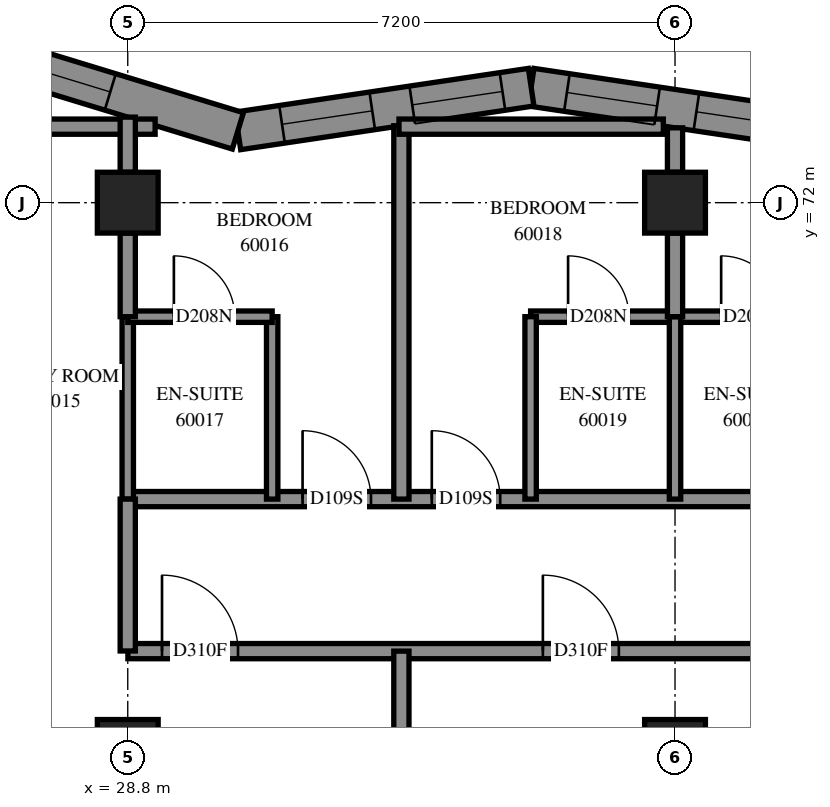
"""IFC4 building model, lengths in metres.
Left out: names, types, materials, properties, quantities, classifications, styles, units other than length and angle.
Written with IfcOpenShell. Run it as: python <this file> out.ifc"""

import sys

from ifc_helpers import new_model, si_unit, direction, frame, frame_2d, origin, origin_2d, place, context, subcontext, project, spatial, polyline, rectangle, outline, extrude, element, fill, save


model = new_model("IFC4")
c1 = context("Model", 3, precision=1e-05, world=origin(), true_north=direction((0.0, 1.0)))
c2 = subcontext(c1, "Body", "Model", "MODEL_VIEW")
j1 = project(units=[si_unit("LENGTHUNIT", "METRE"), si_unit("PLANEANGLEUNIT", "RADIAN")], contexts=[c1])
p1 = place(None, origin())
s1 = spatial("IfcSite", under=j1, at=p1, CompositionType="ELEMENT")
p2 = place(p1, origin())
s2 = spatial("IfcBuilding", under=s1, at=p2, CompositionType="ELEMENT")
p3 = place(p2, frame((0.0, 0.0, 220.2)))
s3 = spatial("IfcBuildingStorey", under=s2, at=p3, CompositionType="ELEMENT", Elevation=220.2)
for number, where, z_axis, x_axis in (
    (1, (28.8, 64.8, 0.0), (0.0, 0.0, 1.0), (1.0, 0.0, 0.0)),
    (2, (28.8, 72.0, 0.0), (0.0, 0.0, 1.0), (1.0, 0.0, 0.0)),
    (3, (36.0, 64.8, 0.0), (0.0, 0.0, 1.0), (1.0, 0.0, 0.0)),
    (4, (36.0, 72.0, 0.0), (0.0, 0.0, 1.0), (1.0, 0.0, 0.0)),
):
    element("IfcColumn", number, at=place(p3, frame(where, z_axis=z_axis, x_axis=x_axis)), inside=s3, PredefinedType="COLUMN", context=c2, shape_type="SweptSolid", body=[
        extrude(rectangle(XDim=0.8, YDim=0.8, at=origin_2d()), origin(), (0.0, 0.0, 1.0), 3.1),
    ])
p4 = place(p3, frame((37.947, 72.947, 0.0), z_axis=(0.0, 0.0, 1.0), x_axis=(-0.9890847468, 0.1473477641, 0.0)))
e5 = element("IfcWall", 5, at=p4, inside=s3, PredefinedType="SOLIDWALL", context=c2, shape_type="SweptSolid", body=[
    extrude(outline(polyline([(0.037, -0.25), (3.919, -0.25), (3.845, 0.25), (-0.037, 0.25), (0.037, -0.25)])), origin(), (0.0, 0.0, 1.0), 3.1),
])
p5 = place(p4, frame((0.484, 0.0, 0.45)))
e6 = element("IfcOpeningElement", 6, at=p5, cuts=e5, PredefinedType="OPENING", context=c2, shape_type="SweptSolid", body=[
    extrude(rectangle(XDim=1.2, YDim=2.5, at=frame_2d((0.6, 1.25))), frame((0.0, 0.26, 0.0), z_axis=(0.0, -1.0, 0.0), x_axis=(1.0, 0.0, 0.0)), (0.0, 0.0, 1.0), 0.52),
])
p6 = place(p4, frame((2.207, 0.0, 0.45)))
e7 = element("IfcOpeningElement", 7, at=p6, cuts=e5, PredefinedType="OPENING", context=c2, shape_type="SweptSolid", body=[
    extrude(rectangle(XDim=1.2, YDim=2.5, at=frame_2d((0.6, 1.25))), frame((0.0, 0.26, 0.0), z_axis=(0.0, -1.0, 0.0), x_axis=(1.0, 0.0, 0.0)), (0.0, 0.0, 1.0), 0.52),
])
p7 = place(p3, frame((34.107, 73.519, 0.0), z_axis=(0.0, 0.0, 1.0), x_axis=(-0.9890858863, -0.1473401149, 0.0)))
e8 = element("IfcWall", 8, at=p7, inside=s3, PredefinedType="SOLIDWALL", context=c2, shape_type="SweptSolid", body=[
    extrude(outline(polyline([(-0.037, -0.25), (3.845, -0.25), (3.958, 0.25), (0.037, 0.25), (-0.037, -0.25)])), origin(), (0.0, 0.0, 1.0), 3.1),
])
p8 = place(p7, frame((0.382, 0.0, 0.45)))
e9 = element("IfcOpeningElement", 9, at=p8, cuts=e8, PredefinedType="OPENING", context=c2, shape_type="SweptSolid", body=[
    extrude(rectangle(XDim=1.2, YDim=2.5, at=frame_2d((0.6, 1.25))), frame((0.0, 0.26, 0.0), z_axis=(0.0, -1.0, 0.0), x_axis=(1.0, 0.0, 0.0)), (0.0, 0.0, 1.0), 0.52),
])
p9 = place(p7, frame((2.114, 0.0, 0.45)))
e10 = element("IfcOpeningElement", 10, at=p9, cuts=e8, PredefinedType="OPENING", context=c2, shape_type="SweptSolid", body=[
    extrude(rectangle(XDim=1.2, YDim=2.5, at=frame_2d((0.6, 1.25))), frame((0.0, 0.26, 0.0), z_axis=(0.0, -1.0, 0.0), x_axis=(1.0, 0.0, 0.0)), (0.0, 0.0, 1.0), 0.52),
])
p10 = place(p3, frame((30.249, 72.944, 0.0), z_axis=(0.0, 0.0, 1.0), x_axis=(-0.9564351236, 0.2919449508, 0.0)))
e11 = element("IfcWall", 11, at=p10, inside=s3, PredefinedType="SOLIDWALL", context=c2, shape_type="SweptSolid", body=[
    extrude(outline(polyline([(0.056, -0.25), (4.071, -0.25), (3.396, 0.25), (-0.056, 0.25), (0.056, -0.25)])), origin(), (0.0, 0.0, 1.0), 3.1),
])
p11 = place(p10, frame((1.755, 0.0, 0.45)))
e12 = element("IfcOpeningElement", 12, at=p11, cuts=e11, PredefinedType="OPENING", context=c2, shape_type="SweptSolid", body=[
    extrude(rectangle(XDim=1.2, YDim=2.5, at=frame_2d((0.6, 1.25))), frame((0.0, 0.26, 0.0), z_axis=(0.0, -1.0, 0.0), x_axis=(1.0, 0.0, 0.0)), (0.0, 0.0, 1.0), 0.52),
])
p12 = place(p3, frame((28.8, 68.1, 0.0), z_axis=(0.0, 0.0, 1.0), x_axis=(1.0, 0.0, 0.0)))
e13 = element("IfcWall", 13, at=p12, inside=s3, PredefinedType="PARTITIONING", context=c2, shape_type="SweptSolid", body=[
    extrude(rectangle(XDim=11.8, YDim=0.2, at=frame_2d((5.9, 0.0))), origin(), (0.0, 0.0, 1.0), 3.1),
])
p13 = place(p12, frame((2.3, 0.0, 0.0)))
e14 = element("IfcOpeningElement", 14, at=p13, cuts=e13, PredefinedType="OPENING", context=c2, shape_type="SweptSolid", body=[
    extrude(rectangle(XDim=0.9, YDim=2.1, at=frame_2d((0.45, 1.05))), frame((0.0, 0.11, 0.0), z_axis=(0.0, -1.0, 0.0), x_axis=(1.0, 0.0, 0.0)), (0.0, 0.0, 1.0), 0.22),
])
p14 = place(p12, frame((4.0, 0.0, 0.0)))
e15 = element("IfcOpeningElement", 15, at=p14, cuts=e13, PredefinedType="OPENING", context=c2, shape_type="SweptSolid", body=[
    extrude(rectangle(XDim=0.9, YDim=2.1, at=frame_2d((0.45, 1.05))), frame((0.0, 0.11, 0.0), z_axis=(0.0, -1.0, 0.0), x_axis=(1.0, 0.0, 0.0)), (0.0, 0.0, 1.0), 0.22),
])
p15 = place(p12, frame((9.5, 0.0, 0.0)))
e16 = element("IfcOpeningElement", 16, at=p15, cuts=e13, PredefinedType="OPENING", context=c2, shape_type="SweptSolid", body=[
    extrude(rectangle(XDim=0.9, YDim=2.1, at=frame_2d((0.45, 1.05))), frame((0.0, 0.11, 0.0), z_axis=(0.0, -1.0, 0.0), x_axis=(1.0, 0.0, 0.0)), (0.0, 0.0, 1.0), 0.22),
])
p16 = place(p3, frame((28.802, 66.1, 0.0), z_axis=(0.0, 0.0, 1.0), x_axis=(1.0, 0.0, 0.0)))
e17 = element("IfcWall", 17, at=p16, inside=s3, PredefinedType="PARTITIONING", context=c2, shape_type="SweptSolid", body=[
    extrude(rectangle(XDim=9.798, YDim=0.2, at=frame_2d((4.899, 0.0))), origin(), (0.0, 0.0, 1.0), 3.1),
])
p17 = place(p16, frame((0.449, 0.0, 0.0)))
e18 = element("IfcOpeningElement", 18, at=p17, cuts=e17, PredefinedType="OPENING", context=c2, shape_type="SweptSolid", body=[
    extrude(rectangle(XDim=1.0, YDim=2.1, at=frame_2d((0.5, 1.05))), frame((0.0, 0.11, 0.0), z_axis=(0.0, -1.0, 0.0), x_axis=(1.0, 0.0, 0.0)), (0.0, 0.0, 1.0), 0.22),
])
p18 = place(p16, frame((5.459, 0.0, 0.0)))
e19 = element("IfcOpeningElement", 19, at=p18, cuts=e17, PredefinedType="OPENING", context=c2, shape_type="SweptSolid", body=[
    extrude(rectangle(XDim=1.0, YDim=2.1, at=frame_2d((0.5, 1.05))), frame((0.0, 0.11, 0.0), z_axis=(0.0, -1.0, 0.0), x_axis=(1.0, 0.0, 0.0)), (0.0, 0.0, 1.0), 0.22),
])
p19 = place(p3, frame((32.4, 68.1, 0.0), z_axis=(0.0, 0.0, 1.0), x_axis=(0.0, 1.0, 0.0)))
e20 = element("IfcWall", 20, at=p19, inside=s3, PredefinedType="PARTITIONING", context=c2, shape_type="SweptSolid", body=[
    extrude(rectangle(XDim=4.912, YDim=0.2, at=frame_2d((2.456, 0.0))), origin(), (0.0, 0.0, 1.0), 3.1),
])
p20 = place(p3, frame((34.1, 70.5, 0.0), z_axis=(0.0, 0.0, 1.0), x_axis=(1.0, 0.0, 0.0)))
e21 = element("IfcWall", 21, at=p20, inside=s3, PredefinedType="PARTITIONING", context=c2, shape_type="SweptSolid", body=[
    extrude(rectangle(XDim=3.8, YDim=0.15, at=frame_2d((1.9, 0.0))), origin(), (0.0, 0.0, 1.0), 3.1),
])
p21 = place(p20, frame((0.493, 0.0, 0.0)))
e22 = element("IfcOpeningElement", 22, at=p21, cuts=e21, PredefinedType="OPENING", context=c2, shape_type="SweptSolid", body=[
    extrude(rectangle(XDim=0.8, YDim=2.1, at=frame_2d((0.4, 1.05))), frame((0.0, 0.085, 0.0), z_axis=(0.0, -1.0, 0.0), x_axis=(1.0, 0.0, 0.0)), (0.0, 0.0, 1.0), 0.17),
])
p22 = place(p20, frame((2.507, 0.0, 0.0)))
e23 = element("IfcOpeningElement", 23, at=p22, cuts=e21, PredefinedType="OPENING", context=c2, shape_type="SweptSolid", body=[
    extrude(rectangle(XDim=0.8, YDim=2.1, at=frame_2d((0.4, 1.05))), frame((0.0, 0.085, 0.0), z_axis=(0.0, -1.0, 0.0), x_axis=(1.0, 0.0, 0.0)), (0.0, 0.0, 1.0), 0.17),
])
p23 = place(p3, frame((32.368, 73.0, 0.0), z_axis=(0.0, 0.0, 1.0), x_axis=(1.0, 0.0, 0.0)))
e24 = element("IfcWall", 24, at=p23, inside=s3, PredefinedType="PARTITIONING", context=c2, shape_type="SweptSolid", body=[
    extrude(rectangle(XDim=3.478, YDim=0.2, at=frame_2d((1.739, 0.0))), origin(), (0.0, 0.0, 1.0), 3.1),
])
p24 = place(p3, frame((28.8, 68.1, 0.0), z_axis=(0.0, 0.0, 1.0), x_axis=(0.0, 1.0, 0.0)))
e25 = element("IfcWall", 25, at=p24, inside=s3, PredefinedType="PARTITIONING", context=c2, shape_type="SweptSolid", body=[
    extrude(rectangle(XDim=2.4, YDim=0.15, at=frame_2d((1.2, 0.0))), origin(), (0.0, 0.0, 1.0), 2.6),
])
for number, where, z_axis, x_axis in (
    (26, (30.7, 68.1, 0.0), (0.0, 0.0, 1.0), (0.0, 1.0, 0.0)),
    (27, (34.1, 68.1, 0.0), (0.0, 0.0, 1.0), (0.0, 1.0, 0.0)),
    (28, (36.0, 68.1, 0.0), (0.0, 0.0, 1.0), (0.0, 1.0, 0.0)),
):
    element("IfcWall", number, at=place(p3, frame(where, z_axis=z_axis, x_axis=x_axis)), inside=s3, PredefinedType="PARTITIONING", context=c2, shape_type="SweptSolid", body=[
        extrude(rectangle(XDim=2.4, YDim=0.15, at=frame_2d((1.2, 0.0))), origin(), (0.0, 0.0, 1.0), 3.1),
    ])
p25 = place(p3, frame((26.928, 73.0, 0.0), z_axis=(0.0, 0.0, 1.0), x_axis=(1.0, 0.0, 0.0)))
e29 = element("IfcWall", 29, at=p25, inside=s3, PredefinedType="PARTITIONING", context=c2, shape_type="SweptSolid", body=[
    extrude(rectangle(XDim=2.232, YDim=0.2, at=frame_2d((1.116, 0.0))), origin(), (0.0, 0.0, 1.0), 3.1),
])
p26 = place(p3, frame((28.8, 66.102, 0.0), z_axis=(0.0, 0.0, 1.0), x_axis=(0.0, 1.0, 0.0)))
e30 = element("IfcWall", 30, at=p26, inside=s3, PredefinedType="PARTITIONING", context=c2, shape_type="SweptSolid", body=[
    extrude(rectangle(XDim=1.998, YDim=0.2, at=frame_2d((0.999, 0.0))), origin(), (0.0, 0.0, 1.0), 2.6),
])
p27 = place(p3, frame((32.4, 64.1, 0.0), z_axis=(0.0, 0.0, 1.0), x_axis=(0.0, 1.0, 0.0)))
e31 = element("IfcWall", 31, at=p27, inside=s3, PredefinedType="PARTITIONING", context=c2, shape_type="SweptSolid", body=[
    extrude(rectangle(XDim=2.0, YDim=0.2, at=frame_2d((1.0, 0.0))), origin(), (0.0, 0.0, 1.0), 3.1),
])
p28 = place(p3, frame((28.8, 70.5, 0.0), z_axis=(0.0, 0.0, 1.0), x_axis=(1.0, 0.0, 0.0)))
e32 = element("IfcWall", 32, at=p28, inside=s3, PredefinedType="PARTITIONING", context=c2, shape_type="SweptSolid", body=[
    extrude(rectangle(XDim=1.9, YDim=0.15, at=frame_2d((0.95, 0.0))), origin(), (0.0, 0.0, 1.0), 3.1),
])
p29 = place(p28, frame((0.607, 0.0, 0.0)))
e33 = element("IfcOpeningElement", 33, at=p29, cuts=e32, PredefinedType="OPENING", context=c2, shape_type="SweptSolid", body=[
    extrude(rectangle(XDim=0.8, YDim=2.1, at=frame_2d((0.4, 1.05))), frame((0.0, 0.085, 0.0), z_axis=(0.0, -1.0, 0.0), x_axis=(1.0, 0.0, 0.0)), (0.0, 0.0, 1.0), 0.17),
])
p30 = place(p3, frame((28.8, 70.5, 0.0), z_axis=(0.0, 0.0, 1.0), x_axis=(0.0, 1.0, 0.0)))
e34 = element("IfcWall", 34, at=p30, inside=s3, PredefinedType="PARTITIONING", context=c2, shape_type="SweptSolid", body=[
    extrude(rectangle(XDim=1.1, YDim=0.2, at=frame_2d((0.55, 0.0))), origin(), (0.0, 0.0, 1.0), 2.6),
])
p31 = place(p3, frame((36.0, 70.5, 0.0), z_axis=(0.0, 0.0, 1.0), x_axis=(0.0, 1.0, 0.0)))
e35 = element("IfcWall", 35, at=p31, inside=s3, PredefinedType="PARTITIONING", context=c2, shape_type="SweptSolid", body=[
    extrude(rectangle(XDim=1.1, YDim=0.2, at=frame_2d((0.55, 0.0))), origin(), (0.0, 0.0, 1.0), 3.1),
])
p32 = place(p3, frame((28.8, 72.4, 0.0), z_axis=(0.0, 0.0, 1.0), x_axis=(0.0, 1.0, 0.0)))
e36 = element("IfcWall", 36, at=p32, inside=s3, PredefinedType="PARTITIONING", context=c2, shape_type="SweptSolid", body=[
    extrude(rectangle(XDim=0.725, YDim=0.2, at=frame_2d((0.363, 0.0))), origin(), (0.0, 0.0, 1.0), 3.1),
])
p33 = place(p3, frame((36.0, 72.4, 0.0), z_axis=(0.0, 0.0, 1.0), x_axis=(0.0, 1.0, 0.0)))
e37 = element("IfcWall", 37, at=p33, inside=s3, PredefinedType="PARTITIONING", context=c2, shape_type="SweptSolid", body=[
    extrude(rectangle(XDim=0.585, YDim=0.2, at=frame_2d((0.292, 0.0))), origin(), (0.0, 0.0, 1.0), 3.1),
])
p34 = place(p5, origin())
e38 = element("IfcWindow", 38, at=p34, inside=s3, PartitioningType="SINGLE_PANEL", PredefinedType="WINDOW", context=c2, shape_type="SweptSolid", body=[
    extrude(rectangle(XDim=1.2, YDim=2.5, at=frame_2d((0.6, 1.25))), frame((0.0, 0.18, 0.0), z_axis=(0.0, -1.0, 0.0), x_axis=(1.0, 0.0, 0.0)), (0.0, 0.0, 1.0), 0.06),
])
fill(e6, e38)
p35 = place(p6, origin())
e39 = element("IfcWindow", 39, at=p35, inside=s3, PartitioningType="SINGLE_PANEL", PredefinedType="WINDOW", context=c2, shape_type="SweptSolid", body=[
    extrude(rectangle(XDim=1.2, YDim=2.5, at=frame_2d((0.6, 1.25))), frame((0.0, 0.14, 0.0), z_axis=(0.0, -1.0, 0.0), x_axis=(1.0, 0.0, 0.0)), (0.0, 0.0, 1.0), 0.06),
])
fill(e7, e39)
p36 = place(p8, origin())
e40 = element("IfcWindow", 40, at=p36, inside=s3, PartitioningType="SINGLE_PANEL", PredefinedType="WINDOW", context=c2, shape_type="SweptSolid", body=[
    extrude(rectangle(XDim=1.2, YDim=2.5, at=frame_2d((0.6, 1.25))), frame((0.0, 0.15, 0.0), z_axis=(0.0, -1.0, 0.0), x_axis=(1.0, 0.0, 0.0)), (0.0, 0.0, 1.0), 0.06),
])
fill(e9, e40)
p37 = place(p9, origin())
e41 = element("IfcWindow", 41, at=p37, inside=s3, PartitioningType="SINGLE_PANEL", PredefinedType="WINDOW", context=c2, shape_type="SweptSolid", body=[
    extrude(rectangle(XDim=1.2, YDim=2.5, at=frame_2d((0.6, 1.25))), frame((0.0, 0.18, 0.0), z_axis=(0.0, -1.0, 0.0), x_axis=(1.0, 0.0, 0.0)), (0.0, 0.0, 1.0), 0.06),
])
fill(e10, e41)
p38 = place(p11, origin())
e42 = element("IfcWindow", 42, at=p38, inside=s3, PartitioningType="SINGLE_PANEL", PredefinedType="WINDOW", context=c2, shape_type="SweptSolid", body=[
    extrude(rectangle(XDim=1.2, YDim=2.5, at=frame_2d((0.6, 1.25))), frame((0.0, 0.18, 0.0), z_axis=(0.0, -1.0, 0.0), x_axis=(1.0, 0.0, 0.0)), (0.0, 0.0, 1.0), 0.06),
])
fill(e12, e42)
p39 = place(p17, origin())
e43 = element("IfcDoor", 43, at=p39, inside=s3, OperationType="SINGLE_SWING_LEFT", PredefinedType="DOOR", context=c2, shape_type="SweptSolid", body=[
    extrude(rectangle(XDim=1.0, YDim=2.1, at=frame_2d((0.5, 1.05))), frame((0.0, 0.025, 0.0), z_axis=(0.0, -1.0, 0.0), x_axis=(1.0, 0.0, 0.0)), (0.0, 0.0, 1.0), 0.05),
])
fill(e18, e43)
p40 = place(p13, origin())
e44 = element("IfcDoor", 44, at=p40, inside=s3, OperationType="SINGLE_SWING_RIGHT", PredefinedType="DOOR", context=c2, shape_type="SweptSolid", body=[
    extrude(rectangle(XDim=0.9, YDim=2.1, at=frame_2d((0.45, 1.05))), frame((0.0, 0.025, 0.0), z_axis=(0.0, -1.0, 0.0), x_axis=(1.0, 0.0, 0.0)), (0.0, 0.0, 1.0), 0.05),
])
fill(e14, e44)
p41 = place(p29, origin())
e45 = element("IfcDoor", 45, at=p41, inside=s3, OperationType="SINGLE_SWING_RIGHT", PredefinedType="DOOR", context=c2, shape_type="SweptSolid", body=[
    extrude(rectangle(XDim=0.8, YDim=2.1, at=frame_2d((0.4, 1.05))), frame((0.0, 0.025, 0.0), z_axis=(0.0, -1.0, 0.0), x_axis=(1.0, 0.0, 0.0)), (0.0, 0.0, 1.0), 0.05),
])
fill(e33, e45)
p42 = place(p14, origin())
e46 = element("IfcDoor", 46, at=p42, inside=s3, OperationType="SINGLE_SWING_LEFT", PredefinedType="DOOR", context=c2, shape_type="SweptSolid", body=[
    extrude(rectangle(XDim=0.9, YDim=2.1, at=frame_2d((0.45, 1.05))), frame((0.0, 0.025, 0.0), z_axis=(0.0, -1.0, 0.0), x_axis=(1.0, 0.0, 0.0)), (0.0, 0.0, 1.0), 0.05),
])
fill(e15, e46)
p43 = place(p21, origin())
e47 = element("IfcDoor", 47, at=p43, inside=s3, OperationType="SINGLE_SWING_RIGHT", PredefinedType="DOOR", context=c2, shape_type="SweptSolid", body=[
    extrude(rectangle(XDim=0.8, YDim=2.1, at=frame_2d((0.4, 1.05))), frame((0.0, 0.025, 0.0), z_axis=(0.0, -1.0, 0.0), x_axis=(1.0, 0.0, 0.0)), (0.0, 0.0, 1.0), 0.05),
])
fill(e22, e47)
p44 = place(p22, origin())
e48 = element("IfcDoor", 48, at=p44, inside=s3, OperationType="SINGLE_SWING_RIGHT", PredefinedType="DOOR", context=c2, shape_type="SweptSolid", body=[
    extrude(rectangle(XDim=0.8, YDim=2.1, at=frame_2d((0.4, 1.05))), frame((0.0, 0.025, 0.0), z_axis=(0.0, -1.0, 0.0), x_axis=(1.0, 0.0, 0.0)), (0.0, 0.0, 1.0), 0.05),
])
fill(e23, e48)
p45 = place(p18, origin())
e49 = element("IfcDoor", 49, at=p45, inside=s3, OperationType="SINGLE_SWING_RIGHT", PredefinedType="DOOR", context=c2, shape_type="SweptSolid", body=[
    extrude(rectangle(XDim=1.0, YDim=2.1, at=frame_2d((0.5, 1.05))), frame((0.0, 0.025, 0.0), z_axis=(0.0, -1.0, 0.0), x_axis=(1.0, 0.0, 0.0)), (0.0, 0.0, 1.0), 0.05),
])
fill(e19, e49)
save(model, sys.argv[1])
